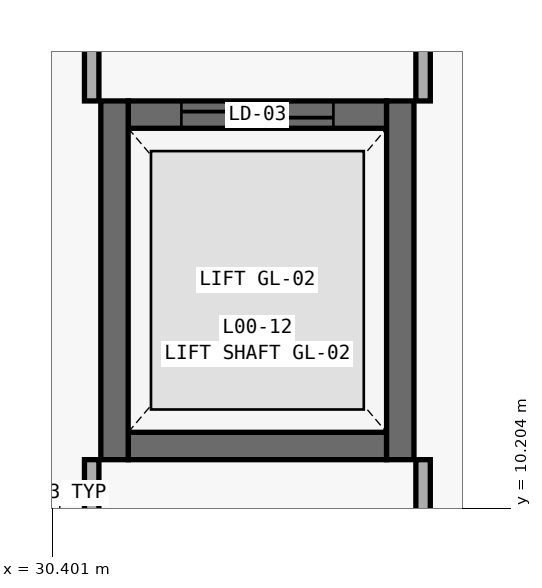
"""IFC4 building model, lengths in metres.
Left out: names, types, materials, properties, quantities, classifications, styles, units other than length and angle.
Written with IfcOpenShell. Run it as: python <this file> out.ifc"""

import sys

from ifc_helpers import new_model, si_unit, direction, frame, frame_2d, origin, place, context, subcontext, project, spatial, rectangle, extrude, element, fill, save


model = new_model("IFC4")
c1 = context("Model", 3, precision=1e-05, world=origin(), true_north=direction((0.0, 1.0)))
c2 = subcontext(c1, "Body", "Model", "MODEL_VIEW")
j1 = project(units=[si_unit("LENGTHUNIT", "METRE"), si_unit("PLANEANGLEUNIT", "RADIAN")], contexts=[c1])
p1 = place(None, origin())
s1 = spatial("IfcSite", under=j1, at=p1, CompositionType="ELEMENT")
p2 = place(p1, origin())
s2 = spatial("IfcBuilding", under=s1, at=p2, CompositionType="ELEMENT")
p3 = place(p2, origin())
s3 = spatial("IfcBuildingStorey", under=s2, at=p3, CompositionType="ELEMENT", Elevation=0.0)
p4 = place(p3, frame((31.4, 15.38, 0.0), z_axis=(0.0, 0.0, 1.0), x_axis=(1.0, 0.0, 0.0)))
e1 = element("IfcWall", 1, at=p4, inside=s3, PredefinedType="SHEAR", context=c2, shape_type="SweptSolid", body=[
    extrude(rectangle(XDim=3.4, YDim=0.36, at=frame_2d((1.7, 0.0))), origin(), (0.0, 0.0, 1.0), 4.5),
])
p5 = place(p4, frame((0.7, 0.0, 0.0)))
e2 = element("IfcOpeningElement", 2, at=p5, cuts=e1, PredefinedType="OPENING", context=c2, shape_type="SweptSolid", body=[
    extrude(rectangle(XDim=2.0, YDim=2.4, at=frame_2d((1.0, 1.2))), frame((0.0, 0.195, 0.0), z_axis=(0.0, -1.0, 0.0), x_axis=(1.0, 0.0, 0.0)), (0.0, 0.0, 1.0), 0.39),
])
p6 = place(p3, frame((31.4, 11.02, 0.0), z_axis=(0.0, 0.0, 1.0), x_axis=(1.0, 0.0, 0.0)))
e3 = element("IfcWall", 3, at=p6, inside=s3, PredefinedType="SHEAR", context=c2, shape_type="SweptSolid", body=[
    extrude(rectangle(XDim=3.4, YDim=0.36, at=frame_2d((1.7, 0.0))), origin(), (0.0, 0.0, 1.0), 4.5),
])
for number, where, z_axis, x_axis in (
    (4, (31.22, 10.84, 0.0), (0.0, 0.0, 1.0), (0.0, 1.0, 0.0)),
    (5, (34.98, 10.84, 0.0), (0.0, 0.0, 1.0), (0.0, 1.0, 0.0)),
):
    element("IfcWall", number, at=place(p3, frame(where, z_axis=z_axis, x_axis=x_axis)), inside=s3, PredefinedType="SHEAR", context=c2, shape_type="SweptSolid", body=[
        extrude(rectangle(XDim=4.72, YDim=0.36, at=frame_2d((2.36, 0.0))), origin(), (0.0, 0.0, 1.0), 4.5),
    ])
p7 = place(p3, frame((30.92, 9.015, 0.0), z_axis=(0.0, 0.0, 1.0), x_axis=(0.0, 1.0, 0.0)))
e6 = element("IfcWall", 6, at=p7, inside=s3, PredefinedType="PARTITIONING", context=c2, shape_type="SweptSolid", body=[
    extrude(rectangle(XDim=1.825, YDim=0.19, at=frame_2d((0.913, 0.0))), origin(), (0.0, 0.0, 1.0), 3.38),
])
p8 = place(p3, frame((30.92, 15.56, 0.0), z_axis=(0.0, 0.0, 1.0), x_axis=(0.0, 1.0, 0.0)))
e7 = element("IfcWall", 7, at=p8, inside=s3, PredefinedType="PARTITIONING", context=c2, shape_type="SweptSolid", body=[
    extrude(rectangle(XDim=0.825, YDim=0.19, at=frame_2d((0.413, 0.0))), origin(), (0.0, 0.0, 1.0), 3.38),
])
p9 = place(p3, frame((35.28, 9.015, 0.0), z_axis=(0.0, 0.0, 1.0), x_axis=(0.0, 1.0, 0.0)))
e8 = element("IfcWall", 8, at=p9, inside=s3, PredefinedType="PARTITIONING", context=c2, shape_type="SweptSolid", body=[
    extrude(rectangle(XDim=1.825, YDim=0.19, at=frame_2d((0.913, 0.0))), origin(), (0.0, 0.0, 1.0), 3.38),
])
p10 = place(p3, frame((35.28, 15.56, 0.0), z_axis=(0.0, 0.0, 1.0), x_axis=(0.0, 1.0, 0.0)))
e9 = element("IfcWall", 9, at=p10, inside=s3, PredefinedType="PARTITIONING", context=c2, shape_type="SweptSolid", body=[
    extrude(rectangle(XDim=0.825, YDim=0.19, at=frame_2d((0.413, 0.0))), origin(), (0.0, 0.0, 1.0), 3.38),
])
p11 = place(p5, origin())
e10 = element("IfcDoor", 10, at=p11, inside=s3, OperationType="DOUBLE_DOOR_SLIDING", PredefinedType="DOOR", context=c2, shape_type="SweptSolid", body=[
    extrude(rectangle(XDim=2.0, YDim=2.4, at=frame_2d((1.0, 1.2))), frame((0.0, 0.025, 0.0), z_axis=(0.0, -1.0, 0.0), x_axis=(1.0, 0.0, 0.0)), (0.0, 0.0, 1.0), 0.05),
])
fill(e2, e10)
save(model, sys.argv[1])
